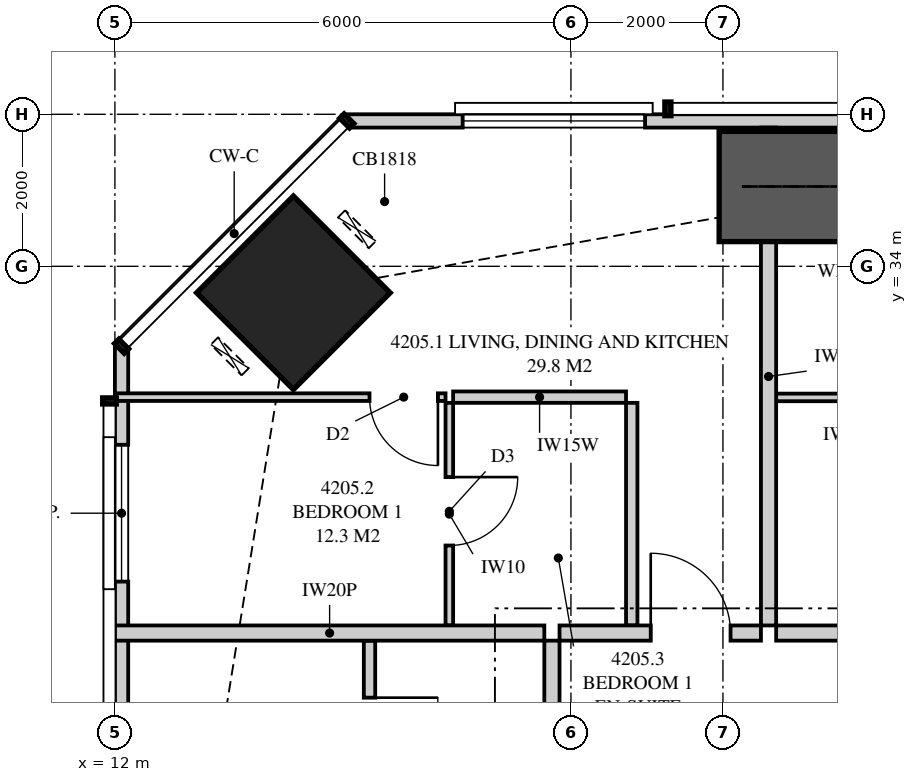
"""IFC4 building model, lengths in metres.
Left out: names, types, materials, properties, quantities, classifications, styles, units other than length and angle.
Written with IfcOpenShell. Run it as: python <this file> out.ifc"""

import sys

from ifc_helpers import new_model, si_unit, direction, frame, frame_2d, origin, origin_2d, place, context, subcontext, project, spatial, polyline, rectangle, hollow_rectangle, outline, extrude, element, fill, save


model = new_model("IFC4")
c1 = context("Model", 3, precision=1e-05, world=origin(), true_north=direction((0.0, 1.0)))
c2 = subcontext(c1, "Body", "Model", "MODEL_VIEW")
j1 = project(units=[si_unit("LENGTHUNIT", "METRE"), si_unit("PLANEANGLEUNIT", "RADIAN")], contexts=[c1])
p1 = place(None, origin())
s1 = spatial("IfcSite", under=j1, at=p1, CompositionType="ELEMENT")
p2 = place(p1, origin())
s2 = spatial("IfcBuilding", under=s1, at=p2, CompositionType="ELEMENT")
p3 = place(p2, frame((0.0, 0.0, 157.7)))
s3 = spatial("IfcBuildingStorey", under=s2, at=p3, CompositionType="ELEMENT", Elevation=157.7)
p4 = place(p3, frame((14.348, 33.652, 0.0), z_axis=(0.0, 0.0, 1.0), x_axis=(0.707106781187, -0.707106781187, 0.0)))
e1 = element("IfcColumn", 1, at=p4, inside=s3, PredefinedType="COLUMN", context=c2, shape_type="SweptSolid", body=[
    extrude(hollow_rectangle(XDim=1.8, YDim=1.8, WallThickness=0.125, at=origin_2d()), origin(), (0.0, 0.0, 1.0), 3.35),
])
p5 = place(p3, frame((49.949, 35.913, 0.0), z_axis=(0.0, 0.0, 1.0), x_axis=(-1.0, 0.0, 0.0)))
e2 = element("IfcWall", 2, at=p5, inside=s3, PredefinedType="SOLIDWALL", context=c2, shape_type="SweptSolid", body=[
    extrude(outline(polyline([(0.0, 0.0), (34.897, 0.0), (34.897, 3.11), (27.91, 3.11), (27.91, 2.15), (27.836, 2.15), (27.836, 3.11), (27.699, 3.11), (27.699, 2.15), (7.199, 2.15), (7.199, 3.11), (7.062, 3.11), (7.062, 2.15), (6.987, 2.15), (6.987, 3.11), (0.0, 3.11), (0.0, 0.0)])), frame((0.0, 0.087, 0.0), z_axis=(0.0, -1.0, 0.0), x_axis=(1.0, 0.0, 0.0)), (0.0, 0.0, 1.0), 0.175),
])
p6 = place(p5, frame((2.389, 0.0, 0.4)))
e3 = element("IfcOpeningElement", 3, at=p6, cuts=e2, PredefinedType="OPENING", context=c2, shape_type="SweptSolid", body=[
    extrude(rectangle(XDim=2.4, YDim=1.7, at=frame_2d((1.2, 0.85))), frame((0.0, 0.097, 0.0), z_axis=(0.0, -1.0, 0.0), x_axis=(1.0, 0.0, 0.0)), (0.0, 0.0, 1.0), 0.195),
])
p7 = place(p5, frame((10.299, 0.0, 0.0)))
e4 = element("IfcOpeningElement", 4, at=p7, cuts=e2, PredefinedType="OPENING", context=c2, shape_type="SweptSolid", body=[
    extrude(rectangle(XDim=1.8, YDim=2.1, at=frame_2d((0.9, 1.05))), frame((0.0, 0.097, 0.0), z_axis=(0.0, -1.0, 0.0), x_axis=(1.0, 0.0, 0.0)), (0.0, 0.0, 1.0), 0.195),
])
p8 = place(p5, frame((12.649, 0.0, 0.4)))
e5 = element("IfcOpeningElement", 5, at=p8, cuts=e2, PredefinedType="OPENING", context=c2, shape_type="SweptSolid", body=[
    extrude(rectangle(XDim=2.4, YDim=1.7, at=frame_2d((1.2, 0.85))), frame((0.0, 0.097, 0.0), z_axis=(0.0, -1.0, 0.0), x_axis=(1.0, 0.0, 0.0)), (0.0, 0.0, 1.0), 0.195),
])
p9 = place(p5, frame((22.699, 0.0, 0.0)))
e6 = element("IfcOpeningElement", 6, at=p9, cuts=e2, PredefinedType="OPENING", context=c2, shape_type="SweptSolid", body=[
    extrude(rectangle(XDim=1.8, YDim=2.1, at=frame_2d((0.9, 1.05))), frame((0.0, 0.097, 0.0), z_axis=(0.0, -1.0, 0.0), x_axis=(1.0, 0.0, 0.0)), (0.0, 0.0, 1.0), 0.195),
])
p10 = place(p5, frame((19.849, 0.0, 0.4)))
e7 = element("IfcOpeningElement", 7, at=p10, cuts=e2, PredefinedType="OPENING", context=c2, shape_type="SweptSolid", body=[
    extrude(rectangle(XDim=2.4, YDim=1.7, at=frame_2d((1.2, 0.85))), frame((0.0, 0.097, 0.0), z_axis=(0.0, -1.0, 0.0), x_axis=(1.0, 0.0, 0.0)), (0.0, 0.0, 1.0), 0.195),
])
p11 = place(p5, frame((30.973, 0.0, 0.4)))
e8 = element("IfcOpeningElement", 8, at=p11, cuts=e2, PredefinedType="OPENING", context=c2, shape_type="SweptSolid", body=[
    extrude(rectangle(XDim=2.4, YDim=1.7, at=frame_2d((1.2, 0.85))), frame((0.0, 0.097, 0.0), z_axis=(0.0, -1.0, 0.0), x_axis=(1.0, 0.0, 0.0)), (0.0, 0.0, 1.0), 0.195),
])
p12 = place(p3, frame((12.087, 32.949, 0.0), z_axis=(0.0, 0.0, 1.0), x_axis=(0.0, -1.0, 0.0)))
e9 = element("IfcWall", 9, at=p12, inside=s3, PredefinedType="SOLIDWALL", context=c2, shape_type="SweptSolid", body=[
    extrude(outline(polyline([(0.0, 0.0), (29.897, 0.0), (29.897, 3.11), (20.191, 3.11), (20.191, 2.15), (20.051, 2.15), (20.051, 3.11), (19.949, 3.11), (19.949, 2.15), (7.949, 2.15), (7.949, 3.11), (7.823, 3.11), (7.823, 2.15), (7.73, 2.15), (7.73, 3.11), (0.0, 3.11), (0.0, 0.0)])), frame((0.0, 0.087, 0.0), z_axis=(0.0, -1.0, 0.0), x_axis=(1.0, 0.0, 0.0)), (0.0, 0.0, 1.0), 0.175),
])
p13 = place(p12, frame((1.297, 0.0, 0.4)))
e10 = element("IfcOpeningElement", 10, at=p13, cuts=e9, PredefinedType="OPENING", context=c2, shape_type="SweptSolid", body=[
    extrude(rectangle(XDim=1.8, YDim=1.7, at=frame_2d((0.9, 0.85))), frame((0.0, 0.097, 0.0), z_axis=(0.0, -1.0, 0.0), x_axis=(1.0, 0.0, 0.0)), (0.0, 0.0, 1.0), 0.195),
])
p14 = place(p12, frame((10.367, 0.0, 0.4)))
e11 = element("IfcOpeningElement", 11, at=p14, cuts=e9, PredefinedType="OPENING", context=c2, shape_type="SweptSolid", body=[
    extrude(rectangle(XDim=1.2, YDim=1.7, at=frame_2d((0.6, 0.85))), frame((0.0, 0.097, 0.0), z_axis=(0.0, -1.0, 0.0), x_axis=(1.0, 0.0, 0.0)), (0.0, 0.0, 1.0), 0.195),
])
p15 = place(p12, frame((15.083, 0.0, 0.4)))
e12 = element("IfcOpeningElement", 12, at=p15, cuts=e9, PredefinedType="OPENING", context=c2, shape_type="SweptSolid", body=[
    extrude(rectangle(XDim=2.4, YDim=1.7, at=frame_2d((1.2, 0.85))), frame((0.0, 0.097, 0.0), z_axis=(0.0, -1.0, 0.0), x_axis=(1.0, 0.0, 0.0)), (0.0, 0.0, 1.0), 0.195),
])
p16 = place(p12, frame((22.624, 0.0, 0.0)))
e13 = element("IfcOpeningElement", 13, at=p16, cuts=e9, PredefinedType="OPENING", context=c2, shape_type="SweptSolid", body=[
    extrude(rectangle(XDim=1.8, YDim=2.1, at=frame_2d((0.9, 1.05))), frame((0.0, 0.097, 0.0), z_axis=(0.0, -1.0, 0.0), x_axis=(1.0, 0.0, 0.0)), (0.0, 0.0, 1.0), 0.195),
])
p17 = place(p12, frame((26.301, 0.0, 0.4)))
e14 = element("IfcOpeningElement", 14, at=p17, cuts=e9, PredefinedType="OPENING", context=c2, shape_type="SweptSolid", body=[
    extrude(rectangle(XDim=1.8, YDim=1.7, at=frame_2d((0.9, 0.85))), frame((0.0, 0.097, 0.0), z_axis=(0.0, -1.0, 0.0), x_axis=(1.0, 0.0, 0.0)), (0.0, 0.0, 1.0), 0.195),
])
p18 = place(p3, frame((20.6, 35.825, 0.0), z_axis=(0.0, 0.0, 1.0), x_axis=(0.0, -1.0, 0.0)))
e15 = element("IfcWall", 15, at=p18, inside=s3, PredefinedType="PARTITIONING", context=c2, shape_type="SweptSolid", body=[
    extrude(outline(polyline([(0.143, 3.11), (0.0, 3.11), (0.0, 0.0), (0.529, 0.0), (0.529, 0.165), (1.021, 0.165), (1.021, 0.0), (6.55, 0.0), (6.55, 3.11), (1.991, 3.11), (1.991, 2.15), (1.021, 2.15), (1.021, 1.985), (0.529, 1.985), (0.529, 2.15), (0.143, 2.15), (0.143, 3.11)])), frame((0.0, 0.1, 0.0), z_axis=(0.0, -1.0, 0.0), x_axis=(1.0, 0.0, 0.0)), (0.0, 0.0, 1.0), 0.2),
])
p19 = place(p3, frame((17.85, 29.175, 0.0), z_axis=(0.0, 0.0, 1.0), x_axis=(1.0, 0.0, 0.0)))
e16 = element("IfcWall", 16, at=p19, inside=s3, PredefinedType="PARTITIONING", context=c2, shape_type="SweptSolid", body=[
    extrude(rectangle(XDim=2.65, YDim=0.2, at=frame_2d((1.325, 0.0))), origin(), (0.0, 0.0, 1.0), 3.11),
])
p20 = place(p19, frame((1.2, 0.0, 0.0)))
e17 = element("IfcOpeningElement", 17, at=p20, cuts=e16, PredefinedType="OPENING", context=c2, shape_type="SweptSolid", body=[
    extrude(rectangle(XDim=1.05, YDim=2.2, at=frame_2d((0.525, 1.1))), frame((0.0, 0.11, 0.0), z_axis=(0.0, -1.0, 0.0), x_axis=(1.0, 0.0, 0.0)), (0.0, 0.0, 1.0), 0.22),
])
p21 = place(p3, frame((16.4, 32.204, 0.0), z_axis=(0.0, 0.0, 1.0), x_axis=(0.0, -1.0, 0.0)))
e18 = element("IfcWall", 18, at=p21, inside=s3, PredefinedType="PARTITIONING", context=c2, shape_type="SweptSolid", body=[
    extrude(rectangle(XDim=2.929, YDim=0.1, at=frame_2d((1.464, 0.0))), origin(), (0.0, 0.0, 1.0), 3.11),
])
p22 = place(p21, frame((0.977, 0.0, 0.0)))
e19 = element("IfcOpeningElement", 19, at=p22, cuts=e18, PredefinedType="OPENING", context=c2, shape_type="SweptSolid", body=[
    extrude(rectangle(XDim=0.9, YDim=2.1, at=frame_2d((0.45, 1.05))), frame((0.0, 0.06, 0.0), z_axis=(0.0, -1.0, 0.0), x_axis=(1.0, 0.0, 0.0)), (0.0, 0.0, 1.0), 0.12),
])
p23 = place(p3, frame((16.35, 32.279, 0.0), z_axis=(0.0, 0.0, 1.0), x_axis=(-1.0, 0.0, 0.0)))
e20 = element("IfcWall", 20, at=p23, inside=s3, PredefinedType="PARTITIONING", context=c2, shape_type="SweptSolid", body=[
    extrude(outline(polyline([(0.0, 0.0), (4.35, 0.0), (4.35, 3.11), (3.094, 3.11), (3.094, 2.15), (1.352, 2.15), (1.352, 3.11), (0.0, 3.11), (0.0, 0.0)])), frame((0.0, 0.05, 0.0), z_axis=(0.0, -1.0, 0.0), x_axis=(1.0, 0.0, 0.0)), (0.0, 0.0, 1.0), 0.1),
])
p24 = place(p23, frame((0.1, 0.0, 0.0)))
e21 = element("IfcOpeningElement", 21, at=p24, cuts=e20, PredefinedType="OPENING", context=c2, shape_type="SweptSolid", body=[
    extrude(rectangle(XDim=0.9, YDim=2.1, at=frame_2d((0.45, 1.05))), frame((0.0, 0.06, 0.0), z_axis=(0.0, -1.0, 0.0), x_axis=(1.0, 0.0, 0.0)), (0.0, 0.0, 1.0), 0.12),
])
p25 = place(p3, frame((18.725, 32.279, 0.0), z_axis=(0.0, 0.0, 1.0), x_axis=(-1.0, 0.0, 0.0)))
e22 = element("IfcWall", 22, at=p25, inside=s3, PredefinedType="PLUMBINGWALL", context=c2, shape_type="SweptSolid", body=[
    extrude(rectangle(XDim=2.275, YDim=0.15, at=frame_2d((1.138, 0.0))), origin(), (0.0, 0.0, 1.0), 3.11),
])
p26 = place(p3, frame((18.8, 32.204, 0.0), z_axis=(0.0, 0.0, 1.0), x_axis=(0.0, -1.0, 0.0)))
e23 = element("IfcWall", 23, at=p26, inside=s3, PredefinedType="PLUMBINGWALL", context=c2, shape_type="SweptSolid", body=[
    extrude(rectangle(XDim=2.929, YDim=0.15, at=frame_2d((1.464, 0.0))), origin(), (0.0, 0.0, 1.0), 3.11),
])
p27 = place(p3, frame((20.7, 29.175, 0.0), z_axis=(0.0, 0.0, 1.0), x_axis=(1.0, 0.0, 0.0)))
e24 = element("IfcWall", 24, at=p27, inside=s3, PredefinedType="PARTITIONING", context=c2, shape_type="SweptSolid", body=[
    extrude(outline(polyline([(0.0, 0.0), (5.3, 0.0), (5.3, 3.11), (1.896, 3.11), (1.896, 2.531), (1.204, 2.531), (1.204, 3.11), (0.0, 3.11), (0.0, 0.0)])), frame((0.0, 0.1, 0.0), z_axis=(0.0, -1.0, 0.0), x_axis=(1.0, 0.0, 0.0)), (0.0, 0.0, 1.0), 0.2),
])
p28 = place(p3, frame((20.7, 32.275, 0.0), z_axis=(0.0, 0.0, 1.0), x_axis=(1.0, 0.0, 0.0)))
e25 = element("IfcWall", 25, at=p28, inside=s3, PredefinedType="PARTITIONING", context=c2, shape_type="SweptSolid", body=[
    extrude(outline(polyline([(0.0, 0.0), (3.55, 0.0), (3.55, 3.11), (1.846, 3.11), (1.846, 2.531), (1.254, 2.531), (1.254, 3.11), (0.0, 3.11), (0.0, 0.0)])), frame((0.0, 0.05, 0.0), z_axis=(0.0, -1.0, 0.0), x_axis=(1.0, 0.0, 0.0)), (0.0, 0.0, 1.0), 0.1),
])
p29 = place(p28, frame((1.35, 0.0, 0.0)))
e26 = element("IfcOpeningElement", 26, at=p29, cuts=e25, PredefinedType="OPENING", context=c2, shape_type="SweptSolid", body=[
    extrude(rectangle(XDim=0.9, YDim=2.1, at=frame_2d((0.45, 1.05))), frame((0.0, 0.06, 0.0), z_axis=(0.0, -1.0, 0.0), x_axis=(1.0, 0.0, 0.0)), (0.0, 0.0, 1.0), 0.12),
])
p30 = place(p3, frame((12.0, 29.175, 0.0), z_axis=(0.0, 0.0, 1.0), x_axis=(1.0, 0.0, 0.0)))
e27 = element("IfcWall", 27, at=p30, inside=s3, PredefinedType="PARTITIONING", context=c2, shape_type="SweptSolid", body=[
    extrude(outline(polyline([(0.0, 0.0), (5.65, 0.0), (5.65, 3.11), (2.547, 3.11), (2.547, 2.15), (0.703, 2.15), (0.703, 3.11), (0.0, 3.11), (0.0, 0.0)])), frame((0.0, 0.1, 0.0), z_axis=(0.0, -1.0, 0.0), x_axis=(1.0, 0.0, 0.0)), (0.0, 0.0, 1.0), 0.2),
])
p31 = place(p3, frame((15.35, 26.65, 0.0), z_axis=(0.0, 0.0, 1.0), x_axis=(0.0, 1.0, 0.0)))
e28 = element("IfcWall", 28, at=p31, inside=s3, PredefinedType="PLUMBINGWALL", context=c2, shape_type="SweptSolid", body=[
    extrude(rectangle(XDim=2.425, YDim=0.15, at=frame_2d((1.212, 0.0))), origin(), (0.0, 0.0, 1.0), 3.11),
])
p32 = place(p31, frame((0.775, 0.0, 0.0)))
e29 = element("IfcOpeningElement", 29, at=p32, cuts=e28, PredefinedType="OPENING", context=c2, shape_type="SweptSolid", body=[
    extrude(rectangle(XDim=0.9, YDim=2.1, at=frame_2d((0.45, 1.05))), frame((0.0, 0.085, 0.0), z_axis=(0.0, -1.0, 0.0), x_axis=(1.0, 0.0, 0.0)), (0.0, 0.0, 1.0), 0.17),
])
p33 = place(p3, frame((17.75, 24.6, 0.0), z_axis=(0.0, 0.0, 1.0), x_axis=(0.0, 1.0, 0.0)))
e30 = element("IfcWall", 30, at=p33, inside=s3, PredefinedType="PARTITIONING", context=c2, shape_type="SweptSolid", body=[
    extrude(outline(polyline([(0.0, 0.0), (4.475, 0.0), (4.475, 3.11), (0.746, 3.11), (0.746, 2.531), (0.054, 2.531), (0.054, 3.11), (0.0, 3.11), (0.0, 0.0)])), frame((0.0, 0.1, 0.0), z_axis=(0.0, -1.0, 0.0), x_axis=(1.0, 0.0, 0.0)), (0.0, 0.0, 1.0), 0.2),
])
p34 = place(p3, frame((19.95, 35.05, 0.0), z_axis=(0.0, 0.0, 1.0), x_axis=(1.0, 0.0, 0.0)))
e31 = element("IfcWall", 31, at=p34, inside=s3, PredefinedType="SHEAR", context=c2, shape_type="SweptSolid", body=[
    extrude(rectangle(XDim=4.6, YDim=1.45, at=frame_2d((2.3, 0.0))), origin(), (0.0, 0.0, 1.0), 3.35),
])
p35 = place(p11, origin())
e32 = element("IfcWindow", 32, at=p35, inside=s3, PartitioningType="SINGLE_PANEL", PredefinedType="WINDOW", context=c2, shape_type="SweptSolid", body=[
    extrude(rectangle(XDim=2.4, YDim=1.7, at=frame_2d((1.2, 0.85))), frame((0.0, 0.03, 0.0), z_axis=(0.0, -1.0, 0.0), x_axis=(1.0, 0.0, 0.0)), (0.0, 0.0, 1.0), 0.06),
])
fill(e8, e32)
p36 = place(p13, origin())
e33 = element("IfcWindow", 33, at=p36, inside=s3, PartitioningType="SINGLE_PANEL", PredefinedType="WINDOW", context=c2, shape_type="SweptSolid", body=[
    extrude(rectangle(XDim=1.8, YDim=1.7, at=frame_2d((0.9, 0.85))), frame((0.0, 0.03, 0.0), z_axis=(0.0, -1.0, 0.0), x_axis=(1.0, 0.0, 0.0)), (0.0, 0.0, 1.0), 0.06),
])
fill(e10, e33)
p37 = place(p20, origin())
e34 = element("IfcDoor", 34, at=p37, inside=s3, OperationType="SINGLE_SWING_LEFT", PredefinedType="DOOR", context=c2, shape_type="SweptSolid", body=[
    extrude(rectangle(XDim=1.05, YDim=2.2, at=frame_2d((0.525, 1.1))), frame((0.0, 0.025, 0.0), z_axis=(0.0, -1.0, 0.0), x_axis=(1.0, 0.0, 0.0)), (0.0, 0.0, 1.0), 0.05),
])
fill(e17, e34)
p38 = place(p24, origin())
e35 = element("IfcDoor", 35, at=p38, inside=s3, OperationType="SINGLE_SWING_LEFT", PredefinedType="DOOR", context=c2, shape_type="SweptSolid", body=[
    extrude(rectangle(XDim=0.9, YDim=2.1, at=frame_2d((0.45, 1.05))), frame((0.0, 0.025, 0.0), z_axis=(0.0, -1.0, 0.0), x_axis=(1.0, 0.0, 0.0)), (0.0, 0.0, 1.0), 0.05),
])
fill(e21, e35)
p39 = place(p22, origin())
e36 = element("IfcDoor", 36, at=p39, inside=s3, OperationType="SINGLE_SWING_LEFT", PredefinedType="DOOR", context=c2, shape_type="SweptSolid", body=[
    extrude(rectangle(XDim=0.9, YDim=2.1, at=frame_2d((0.45, 1.05))), frame((0.0, 0.025, 0.0), z_axis=(0.0, -1.0, 0.0), x_axis=(1.0, 0.0, 0.0)), (0.0, 0.0, 1.0), 0.05),
])
fill(e19, e36)
p40 = place(p32, frame((0.9, 0.0, 0.0), z_axis=(0.0, 0.0, 1.0), x_axis=(-1.0, 0.0, 0.0)))
e37 = element("IfcDoor", 37, at=p40, inside=s3, OperationType="SINGLE_SWING_LEFT", PredefinedType="DOOR", context=c2, shape_type="SweptSolid", body=[
    extrude(rectangle(XDim=0.9, YDim=2.1, at=frame_2d((0.45, 1.05))), frame((0.0, 0.025, 0.0), z_axis=(0.0, -1.0, 0.0), x_axis=(1.0, 0.0, 0.0)), (0.0, 0.0, 1.0), 0.05),
])
fill(e29, e37)
save(model, sys.argv[1])
